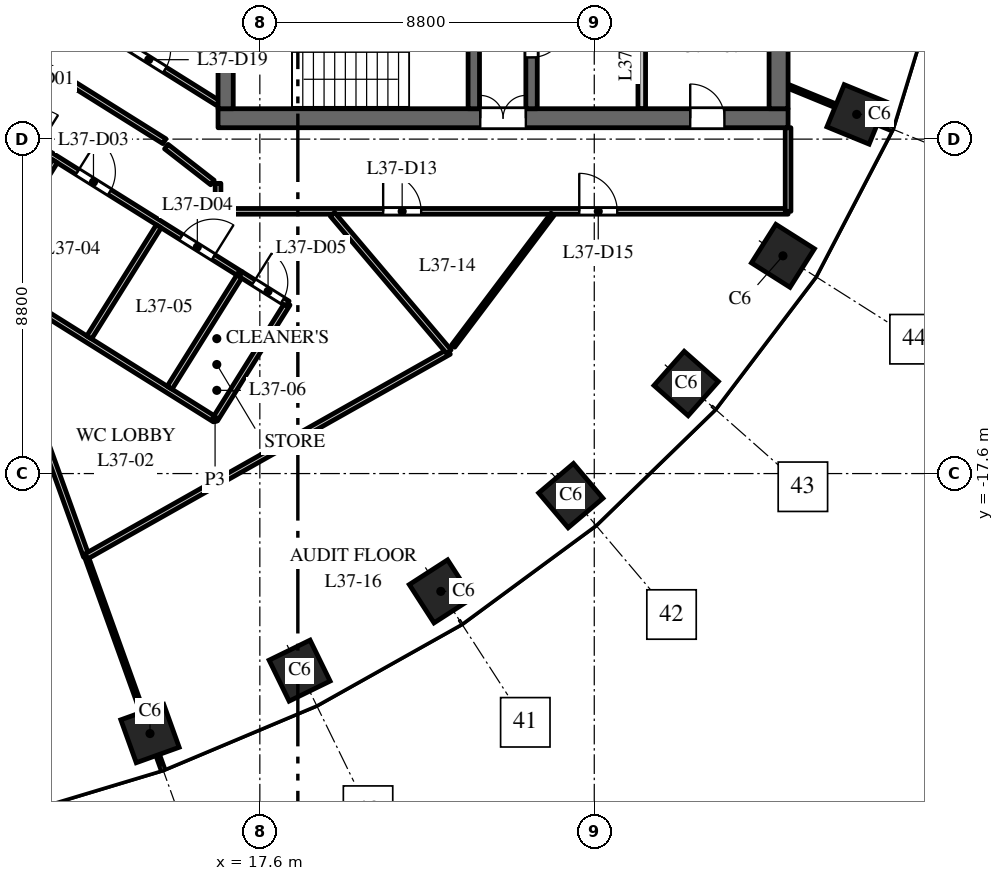
"""IFC4 building model, lengths in metres.
Left out: names, types, materials, properties, quantities, classifications, styles, units other than length and angle.
Written with IfcOpenShell. Run it as: python <this file> out.ifc"""

import sys

from ifc_helpers import new_model, si_unit, direction, frame, frame_2d, origin, origin_2d, place, context, subcontext, project, spatial, rectangle, extrude, element, fill, save


model = new_model("IFC4")
c1 = context("Model", 3, precision=1e-05, world=origin(), true_north=direction((0.0, 1.0)))
c2 = subcontext(c1, "Body", "Model", "MODEL_VIEW")
j1 = project(units=[si_unit("LENGTHUNIT", "METRE"), si_unit("PLANEANGLEUNIT", "RADIAN")], contexts=[c1])
p1 = place(None, origin())
s1 = spatial("IfcSite", under=j1, at=p1, CompositionType="ELEMENT")
p2 = place(p1, origin())
s2 = spatial("IfcBuilding", under=s1, at=p2, CompositionType="ELEMENT")
p3 = place(p2, frame((0.0, 0.0, 162.0)))
s3 = spatial("IfcBuildingStorey", under=s2, at=p3, CompositionType="ELEMENT", Elevation=162.0)
for number, where, z_axis, x_axis in (
    (1, (14.709, -24.441, 0.0), (0.0, 0.0, 1.0), (0.941, 0.338, 0.0)),
    (2, (18.646, -22.785, 0.0), (0.0, 0.0, 1.0), (0.898, 0.439, 0.0)),
    (3, (22.362, -20.7, 0.0), (0.0, 0.0, 1.0), (0.84, 0.542, 0.0)),
    (4, (25.783, -18.18, 0.0), (0.0, 0.0, 1.0), (0.763, 0.646, 0.0)),
    (5, (28.819, -15.23, 0.0), (0.0, 0.0, 1.0), (0.663, 0.749, 0.0)),
    (6, (31.365, -11.871, 0.0), (0.0, 0.0, 1.0), (0.535, 0.845, 0.0)),
    (7, (33.305, -8.149, 0.0), (0.0, 0.0, 1.0), (0.379, 0.925, 0.0)),
):
    element("IfcColumn", number, at=place(p3, frame(where, z_axis=z_axis, x_axis=x_axis)), inside=s3, PredefinedType="COLUMN", context=c2, shape_type="SweptSolid", body=[
        extrude(rectangle(XDim=1.2, YDim=1.2, at=origin_2d()), origin(), (0.0, 0.0, 1.0), 4.0),
    ])
p4 = place(p3, frame((16.5, -8.25, 0.0), z_axis=(0.0, 0.0, 1.0), x_axis=(1.0, 0.0, 0.0)))
e8 = element("IfcWall", 8, at=p4, inside=s3, PredefinedType="SHEAR", context=c2, shape_type="SweptSolid", body=[
    extrude(rectangle(XDim=15.0, YDim=0.5, at=frame_2d((7.5, 0.0))), origin(), (0.0, 0.0, 1.0), 3.7),
])
p5 = place(p4, frame((6.9, 0.0, 0.0)))
e9 = element("IfcOpeningElement", 9, at=p5, cuts=e8, PredefinedType="OPENING", context=c2, shape_type="SweptSolid", body=[
    extrude(rectangle(XDim=1.2, YDim=2.1, at=frame_2d((0.6, 1.05))), frame((0.0, 0.26, 0.0), z_axis=(0.0, -1.0, 0.0), x_axis=(1.0, 0.0, 0.0)), (0.0, 0.0, 1.0), 0.52),
])
p6 = place(p4, frame((12.425, 0.0, 0.0)))
e10 = element("IfcOpeningElement", 10, at=p6, cuts=e8, PredefinedType="OPENING", context=c2, shape_type="SweptSolid", body=[
    extrude(rectangle(XDim=0.9, YDim=2.1, at=frame_2d((0.45, 1.05))), frame((0.0, 0.26, 0.0), z_axis=(0.0, -1.0, 0.0), x_axis=(1.0, 0.0, 0.0)), (0.0, 0.0, 1.0), 0.52),
])
p7 = place(p3, frame((24.75, -8.0, 0.0), z_axis=(0.0, 0.0, 1.0), x_axis=(0.0, 1.0, 0.0)))
e11 = element("IfcWall", 11, at=p7, inside=s3, PredefinedType="SHEAR", context=c2, shape_type="SweptSolid", body=[
    extrude(rectangle(XDim=16.0, YDim=0.3, at=frame_2d((8.0, 0.0))), origin(), (0.0, 0.0, 1.0), 3.7),
])
p8 = place(p7, frame((4.425, 0.0, 0.0)))
e12 = element("IfcOpeningElement", 12, at=p8, cuts=e11, PredefinedType="OPENING", context=c2, shape_type="SweptSolid", body=[
    extrude(rectangle(XDim=1.1, YDim=2.1, at=frame_2d((0.55, 1.05))), frame((0.0, 0.16, 0.0), z_axis=(0.0, -1.0, 0.0), x_axis=(1.0, 0.0, 0.0)), (0.0, 0.0, 1.0), 0.32),
])
p9 = place(p7, frame((7.45, 0.0, 0.0)))
e13 = element("IfcOpeningElement", 13, at=p9, cuts=e11, PredefinedType="OPENING", context=c2, shape_type="SweptSolid", body=[
    extrude(rectangle(XDim=1.1, YDim=2.1, at=frame_2d((0.55, 1.05))), frame((0.0, 0.16, 0.0), z_axis=(0.0, -1.0, 0.0), x_axis=(1.0, 0.0, 0.0)), (0.0, 0.0, 1.0), 0.32),
])
p10 = place(p7, frame((10.475, 0.0, 0.0)))
e14 = element("IfcOpeningElement", 14, at=p10, cuts=e11, PredefinedType="OPENING", context=c2, shape_type="SweptSolid", body=[
    extrude(rectangle(XDim=1.1, YDim=2.1, at=frame_2d((0.55, 1.05))), frame((0.0, 0.16, 0.0), z_axis=(0.0, -1.0, 0.0), x_axis=(1.0, 0.0, 0.0)), (0.0, 0.0, 1.0), 0.32),
])
p11 = place(p7, frame((13.75, 0.0, 0.0)))
e15 = element("IfcOpeningElement", 15, at=p11, cuts=e11, PredefinedType="OPENING", context=c2, shape_type="SweptSolid", body=[
    extrude(rectangle(XDim=0.9, YDim=2.1, at=frame_2d((0.45, 1.05))), frame((0.0, 0.16, 0.0), z_axis=(0.0, -1.0, 0.0), x_axis=(1.0, 0.0, 0.0)), (0.0, 0.0, 1.0), 0.32),
])
p12 = place(p7, frame((1.35, 0.0, 0.0)))
e16 = element("IfcOpeningElement", 16, at=p12, cuts=e11, PredefinedType="OPENING", context=c2, shape_type="SweptSolid", body=[
    extrude(rectangle(XDim=0.9, YDim=2.1, at=frame_2d((0.45, 1.05))), frame((0.0, 0.16, 0.0), z_axis=(0.0, -1.0, 0.0), x_axis=(1.0, 0.0, 0.0)), (0.0, 0.0, 1.0), 0.32),
])
p13 = place(p3, frame((16.7, -8.0, 0.0), z_axis=(0.0, 0.0, 1.0), x_axis=(0.0, 1.0, 0.0)))
e17 = element("IfcWall", 17, at=p13, inside=s3, PredefinedType="SHEAR", context=c2, shape_type="SweptSolid", body=[
    extrude(rectangle(XDim=16.0, YDim=0.4, at=frame_2d((8.0, 0.0))), origin(), (0.0, 0.0, 1.0), 3.7),
])
p14 = place(p3, frame((31.25, -8.0, 0.0), z_axis=(0.0, 0.0, 1.0), x_axis=(0.0, 1.0, 0.0)))
e18 = element("IfcWall", 18, at=p14, inside=s3, PredefinedType="SHEAR", context=c2, shape_type="SweptSolid", body=[
    extrude(rectangle(XDim=16.0, YDim=0.5, at=frame_2d((8.0, 0.0))), origin(), (0.0, 0.0, 1.0), 3.7),
])
p15 = place(p3, frame((27.65, -8.0, 0.0), z_axis=(0.0, 0.0, 1.0), x_axis=(0.0, 1.0, 0.0)))
e19 = element("IfcWall", 19, at=p15, inside=s3, PredefinedType="PARTITIONING", context=c2, shape_type="SweptSolid", body=[
    extrude(rectangle(XDim=3.25, YDim=0.2, at=frame_2d((1.625, 0.0))), origin(), (0.0, 0.0, 1.0), 3.7),
])
p16 = place(p3, frame((23.23, -8.0, 0.0), z_axis=(0.0, 0.0, 1.0), x_axis=(0.0, 1.0, 0.0)))
e20 = element("IfcWall", 20, at=p16, inside=s3, PredefinedType="SHEAR", context=c2, shape_type="SweptSolid", body=[
    extrude(rectangle(XDim=7.875, YDim=0.3, at=frame_2d((3.938, 0.0))), origin(), (0.0, 0.0, 1.0), 3.7),
])
p17 = place(p16, frame((5.15, 0.0, 0.0)))
e21 = element("IfcOpeningElement", 21, at=p17, cuts=e20, PredefinedType="OPENING", context=c2, shape_type="SweptSolid", body=[
    extrude(rectangle(XDim=1.1, YDim=2.1, at=frame_2d((0.55, 1.05))), frame((0.0, 0.16, 0.0), z_axis=(0.0, -1.0, 0.0), x_axis=(1.0, 0.0, 0.0)), (0.0, 0.0, 1.0), 0.32),
])
p18 = place(p3, frame((7.608, -10.661, 0.0), z_axis=(0.0, 0.0, 1.0), x_axis=(0.847562482532, -0.530695617284, 0.0)))
e22 = element("IfcWall", 22, at=p18, inside=s3, PredefinedType="PARTITIONING", context=c2, shape_type="SweptSolid", body=[
    extrude(rectangle(XDim=10.392, YDim=0.15, at=frame_2d((5.196, 0.0))), origin(), (0.0, 0.0, 1.0), 3.7),
])
p19 = place(p3, frame((9.514, -7.61, 0.0), z_axis=(0.0, 0.0, 1.0), x_axis=(0.847740567707, -0.530411095155, 0.0)))
e23 = element("IfcWall", 23, at=p19, inside=s3, PredefinedType="PARTITIONING", context=c2, shape_type="SweptSolid", body=[
    extrude(rectangle(XDim=8.944, YDim=0.15, at=frame_2d((4.472, 0.0))), origin(), (0.0, 0.0, 1.0), 3.7),
])
p20 = place(p19, frame((1.65, 0.0, 0.0)))
e24 = element("IfcOpeningElement", 24, at=p20, cuts=e23, PredefinedType="OPENING", context=c2, shape_type="SweptSolid", body=[
    extrude(rectangle(XDim=1.0, YDim=2.1, at=frame_2d((0.5, 1.05))), frame((0.0, 0.085, 0.0), z_axis=(0.0, -1.0, 0.0), x_axis=(1.0, 0.0, 0.0)), (0.0, 0.0, 1.0), 0.17),
])
p21 = place(p19, frame((3.874, 0.0, 0.0)))
e25 = element("IfcOpeningElement", 25, at=p21, cuts=e23, PredefinedType="OPENING", context=c2, shape_type="SweptSolid", body=[
    extrude(rectangle(XDim=1.0, YDim=2.1, at=frame_2d((0.5, 1.05))), frame((0.0, 0.085, 0.0), z_axis=(0.0, -1.0, 0.0), x_axis=(1.0, 0.0, 0.0)), (0.0, 0.0, 1.0), 0.17),
])
p22 = place(p19, frame((7.098, 0.0, 0.0)))
e26 = element("IfcOpeningElement", 26, at=p22, cuts=e23, PredefinedType="OPENING", context=c2, shape_type="SweptSolid", body=[
    extrude(rectangle(XDim=1.0, YDim=2.1, at=frame_2d((0.5, 1.05))), frame((0.0, 0.085, 0.0), z_axis=(0.0, -1.0, 0.0), x_axis=(1.0, 0.0, 0.0)), (0.0, 0.0, 1.0), 0.17),
])
p23 = place(p3, frame((9.679, -5.469, 0.0), z_axis=(0.0, 0.0, 1.0), x_axis=(0.847602682855, -0.530631408811, 0.0)))
e27 = element("IfcWall", 27, at=p23, inside=s3, PredefinedType="PARTITIONING", context=c2, shape_type="SweptSolid", body=[
    extrude(rectangle(XDim=6.383, YDim=0.15, at=frame_2d((3.191, 0.0))), origin(), (0.0, 0.0, 1.0), 3.7),
])
p24 = place(p23, frame((0.65, 0.0, 0.0)))
e28 = element("IfcOpeningElement", 28, at=p24, cuts=e27, PredefinedType="OPENING", context=c2, shape_type="SweptSolid", body=[
    extrude(rectangle(XDim=1.0, YDim=2.1, at=frame_2d((0.5, 1.05))), frame((0.0, 0.085, 0.0), z_axis=(0.0, -1.0, 0.0), x_axis=(1.0, 0.0, 0.0)), (0.0, 0.0, 1.0), 0.17),
])
p25 = place(p3, frame((10.377, -12.306, 0.0), z_axis=(0.0, 0.0, 1.0), x_axis=(0.530889428354, 0.847441098167, 0.0)))
e29 = element("IfcWall", 29, at=p25, inside=s3, PredefinedType="PARTITIONING", context=c2, shape_type="SweptSolid", body=[
    extrude(rectangle(XDim=3.449, YDim=0.15, at=frame_2d((1.725, 0.0))), origin(), (0.0, 0.0, 1.0), 3.7),
])
p26 = place(p3, frame((10.752, -4.254, 0.0), z_axis=(0.0, 0.0, 1.0), x_axis=(0.847690706888, -0.530490777917, 0.0)))
e30 = element("IfcWall", 30, at=p26, inside=s3, PredefinedType="PARTITIONING", context=c2, shape_type="SweptSolid", body=[
    extrude(rectangle(XDim=6.781, YDim=0.15, at=frame_2d((3.39, 0.0))), origin(), (0.0, 0.0, 1.0), 3.7),
])
p27 = place(p26, frame((4.129, 0.0, 0.0)))
e31 = element("IfcOpeningElement", 31, at=p27, cuts=e30, PredefinedType="OPENING", context=c2, shape_type="SweptSolid", body=[
    extrude(rectangle(XDim=1.0, YDim=2.1, at=frame_2d((0.5, 1.05))), frame((0.0, 0.085, 0.0), z_axis=(0.0, -1.0, 0.0), x_axis=(1.0, 0.0, 0.0)), (0.0, 0.0, 1.0), 0.17),
])
p28 = place(p3, frame((11.429, -15.32, 0.0), z_axis=(0.0, 0.0, 1.0), x_axis=(0.338520464006, -0.940959029634, 0.0)))
e32 = element("IfcWall", 32, at=p28, inside=s3, PredefinedType="PARTITIONING", context=c2, shape_type="SweptSolid", body=[
    extrude(rectangle(XDim=4.735, YDim=0.15, at=frame_2d((2.368, 0.0))), origin(), (0.0, 0.0, 1.0), 3.7),
])
p29 = place(p3, frame((13.032, -19.776, 0.0), z_axis=(0.0, 0.0, 1.0), x_axis=(0.338352371411, -0.941019485856, 0.0)))
e33 = element("IfcWall", 33, at=p29, inside=s3, PredefinedType="PARTITIONING", context=c2, shape_type="SweptSolid", body=[
    extrude(rectangle(XDim=5.959, YDim=0.1, at=frame_2d((2.979, 0.0))), origin(), (0.0, 0.0, 1.0), 2.85),
])
p30 = place(p3, frame((13.034, -19.779, 0.0), z_axis=(0.0, 0.0, 1.0), x_axis=(0.870903388322, 0.491454258512, 0.0)))
e34 = element("IfcWall", 34, at=p30, inside=s3, PredefinedType="PARTITIONING", context=c2, shape_type="SweptSolid", body=[
    extrude(rectangle(XDim=10.955, YDim=0.15, at=frame_2d((5.478, 0.0))), origin(), (0.0, 0.0, 1.0), 3.7),
])
p31 = place(p3, frame((13.11, -14.017, 0.0), z_axis=(0.0, 0.0, 1.0), x_axis=(0.530603340991, 0.847620253727, 0.0)))
e35 = element("IfcWall", 35, at=p31, inside=s3, PredefinedType="PARTITIONING", context=c2, shape_type="SweptSolid", body=[
    extrude(rectangle(XDim=3.448, YDim=0.15, at=frame_2d((1.724, 0.0))), origin(), (0.0, 0.0, 1.0), 3.7),
])
p32 = place(p3, frame((15.226, -15.341, 0.0), z_axis=(0.0, 0.0, 1.0), x_axis=(0.530602850446, 0.847620560805, 0.0)))
e36 = element("IfcWall", 36, at=p32, inside=s3, PredefinedType="PARTITIONING", context=c2, shape_type="SweptSolid", body=[
    extrude(rectangle(XDim=3.524, YDim=0.15, at=frame_2d((1.762, 0.0))), origin(), (0.0, 0.0, 1.0), 3.7),
])
p33 = place(p3, frame((16.422, -16.175, 0.0), z_axis=(0.0, 0.0, 1.0), x_axis=(0.530578570881, 0.84763575911, 0.0)))
e37 = element("IfcWall", 37, at=p33, inside=s3, PredefinedType="PARTITIONING", context=c2, shape_type="SweptSolid", body=[
    extrude(rectangle(XDim=3.596, YDim=0.15, at=frame_2d((1.798, 0.0))), origin(), (0.0, 0.0, 1.0), 3.7),
])
p34 = place(p3, frame((16.5, -10.7, 0.0), z_axis=(0.0, 0.0, 1.0), x_axis=(0.0, 1.0, 0.0)))
e38 = element("IfcWall", 38, at=p34, inside=s3, PredefinedType="PARTITIONING", context=c2, shape_type="SweptSolid", body=[
    extrude(rectangle(XDim=0.736, YDim=0.15, at=frame_2d((0.368, 0.0))), origin(), (0.0, 0.0, 1.0), 3.7),
])
p35 = place(p3, frame((16.5, -10.7, 0.0), z_axis=(0.0, 0.0, 1.0), x_axis=(1.0, 0.0, 0.0)))
e39 = element("IfcWall", 39, at=p35, inside=s3, PredefinedType="PARTITIONING", context=c2, shape_type="SweptSolid", body=[
    extrude(rectangle(XDim=15.0, YDim=0.15, at=frame_2d((7.5, 0.0))), origin(), (0.0, 0.0, 1.0), 2.75),
])
p36 = place(p35, frame((4.345, 0.0, 0.0)))
e40 = element("IfcOpeningElement", 40, at=p36, cuts=e39, PredefinedType="OPENING", context=c2, shape_type="SweptSolid", body=[
    extrude(rectangle(XDim=1.0, YDim=2.1, at=frame_2d((0.5, 1.05))), frame((0.0, 0.085, 0.0), z_axis=(0.0, -1.0, 0.0), x_axis=(1.0, 0.0, 0.0)), (0.0, 0.0, 1.0), 0.17),
])
p37 = place(p35, frame((9.505, 0.0, 0.0)))
e41 = element("IfcOpeningElement", 41, at=p37, cuts=e39, PredefinedType="OPENING", context=c2, shape_type="SweptSolid", body=[
    extrude(rectangle(XDim=1.0, YDim=2.1, at=frame_2d((0.5, 1.05))), frame((0.0, 0.085, 0.0), z_axis=(0.0, -1.0, 0.0), x_axis=(1.0, 0.0, 0.0)), (0.0, 0.0, 1.0), 0.17),
])
p38 = place(p3, frame((17.096, -12.354, 0.0), z_axis=(0.0, 0.0, 1.0), x_axis=(0.847498728789, -0.530797423412, 0.0)))
e42 = element("IfcWall", 42, at=p38, inside=s3, PredefinedType="PARTITIONING", context=c2, shape_type="SweptSolid", body=[
    extrude(rectangle(XDim=1.456, YDim=0.15, at=frame_2d((0.728, 0.0))), origin(), (0.0, 0.0, 1.0), 3.7),
])
p39 = place(p38, frame((0.4, 0.0, 0.0)))
e43 = element("IfcOpeningElement", 43, at=p39, cuts=e42, PredefinedType="OPENING", context=c2, shape_type="SweptSolid", body=[
    extrude(rectangle(XDim=0.9, YDim=2.1, at=frame_2d((0.45, 1.05))), frame((0.0, 0.085, 0.0), z_axis=(0.0, -1.0, 0.0), x_axis=(1.0, 0.0, 0.0)), (0.0, 0.0, 1.0), 0.17),
])
p40 = place(p3, frame((19.511, -10.778, 0.0), z_axis=(0.0, 0.0, 1.0), x_axis=(0.646369264436, -0.763024753197, 0.0)))
e44 = element("IfcWall", 44, at=p40, inside=s3, PredefinedType="PARTITIONING", context=c2, shape_type="SweptSolid", body=[
    extrude(rectangle(XDim=4.74, YDim=0.15, at=frame_2d((2.37, 0.0))), origin(), (0.0, 0.0, 1.0), 3.7),
])
p41 = place(p3, frame((22.688, -14.245, 0.0), z_axis=(0.0, 0.0, 1.0), x_axis=(0.6020222506, 0.798479310804, 0.0)))
e45 = element("IfcWall", 45, at=p41, inside=s3, PredefinedType="PARTITIONING", context=c2, shape_type="SweptSolid", body=[
    extrude(rectangle(XDim=4.342, YDim=0.1, at=frame_2d((2.171, 0.0))), origin(), (0.0, 0.0, 1.0), 2.75),
])
p42 = place(p3, frame((31.5, -10.7, 0.0), z_axis=(0.0, 0.0, 1.0), x_axis=(0.0, 1.0, 0.0)))
e46 = element("IfcWall", 46, at=p42, inside=s3, PredefinedType="PARTITIONING", context=c2, shape_type="SweptSolid", body=[
    extrude(rectangle(XDim=2.2, YDim=0.15, at=frame_2d((1.1, 0.0))), origin(), (0.0, 0.0, 1.0), 2.9),
])
p43 = place(p3, frame((31.5, -7.41, 0.0), z_axis=(0.0, 0.0, 1.0), x_axis=(0.925344112436, -0.379128307542, 0.0)))
e47 = element("IfcWall", 47, at=p43, inside=s3, PredefinedType="PARTITIONING", context=c2, shape_type="SweptSolid", body=[
    extrude(rectangle(XDim=2.954, YDim=0.1, at=frame_2d((1.477, 0.0))), origin(), (0.0, 0.0, 1.0), 3.7),
])
p44 = place(p3, frame((16.352, -9.942, 0.0), z_axis=(0.0, 0.0, 1.0), x_axis=(-0.788950226826, 0.614457109643, 0.0)))
e48 = element("IfcWall", 48, at=p44, inside=s3, PredefinedType="PARTITIONING", context=c2, shape_type="SweptSolid", body=[
    extrude(rectangle(XDim=1.538, YDim=0.15, at=frame_2d((0.769, 0.0))), origin(), (0.0, 0.0, 1.0), 3.7),
])
p45 = place(p5, origin())
e49 = element("IfcDoor", 49, at=p45, inside=s3, OperationType="DOUBLE_DOOR_DOUBLE_SWING", PredefinedType="DOOR", context=c2, shape_type="SweptSolid", body=[
    extrude(rectangle(XDim=1.2, YDim=2.1, at=frame_2d((0.6, 1.05))), frame((0.0, 0.025, 0.0), z_axis=(0.0, -1.0, 0.0), x_axis=(1.0, 0.0, 0.0)), (0.0, 0.0, 1.0), 0.05),
])
fill(e9, e49)
p46 = place(p12, origin())
e50 = element("IfcDoor", 50, at=p46, inside=s3, OperationType="SINGLE_SWING_RIGHT", PredefinedType="DOOR", context=c2, shape_type="SweptSolid", body=[
    extrude(rectangle(XDim=0.9, YDim=2.1, at=frame_2d((0.45, 1.05))), frame((0.0, 0.025, 0.0), z_axis=(0.0, -1.0, 0.0), x_axis=(1.0, 0.0, 0.0)), (0.0, 0.0, 1.0), 0.05),
])
fill(e16, e50)
p47 = place(p6, origin())
e51 = element("IfcDoor", 51, at=p47, inside=s3, OperationType="SINGLE_SWING_RIGHT", PredefinedType="DOOR", context=c2, shape_type="SweptSolid", body=[
    extrude(rectangle(XDim=0.9, YDim=2.1, at=frame_2d((0.45, 1.05))), frame((0.0, 0.025, 0.0), z_axis=(0.0, -1.0, 0.0), x_axis=(1.0, 0.0, 0.0)), (0.0, 0.0, 1.0), 0.05),
])
fill(e10, e51)
p48 = place(p21, origin())
e52 = element("IfcDoor", 52, at=p48, inside=s3, OperationType="SINGLE_SWING_LEFT", PredefinedType="DOOR", context=c2, shape_type="SweptSolid", body=[
    extrude(rectangle(XDim=1.0, YDim=2.1, at=frame_2d((0.5, 1.05))), frame((0.0, 0.025, 0.0), z_axis=(0.0, -1.0, 0.0), x_axis=(1.0, 0.0, 0.0)), (0.0, 0.0, 1.0), 0.05),
])
fill(e25, e52)
p49 = place(p22, origin())
e53 = element("IfcDoor", 53, at=p49, inside=s3, OperationType="SINGLE_SWING_RIGHT", PredefinedType="DOOR", context=c2, shape_type="SweptSolid", body=[
    extrude(rectangle(XDim=1.0, YDim=2.1, at=frame_2d((0.5, 1.05))), frame((0.0, 0.025, 0.0), z_axis=(0.0, -1.0, 0.0), x_axis=(1.0, 0.0, 0.0)), (0.0, 0.0, 1.0), 0.05),
])
fill(e26, e53)
p50 = place(p39, origin())
e54 = element("IfcDoor", 54, at=p50, inside=s3, OperationType="SINGLE_SWING_LEFT", PredefinedType="DOOR", context=c2, shape_type="SweptSolid", body=[
    extrude(rectangle(XDim=0.9, YDim=2.1, at=frame_2d((0.45, 1.05))), frame((0.0, 0.025, 0.0), z_axis=(0.0, -1.0, 0.0), x_axis=(1.0, 0.0, 0.0)), (0.0, 0.0, 1.0), 0.05),
])
fill(e43, e54)
p51 = place(p36, origin())
e55 = element("IfcDoor", 55, at=p51, inside=s3, OperationType="SINGLE_SWING_LEFT", PredefinedType="DOOR", context=c2, shape_type="SweptSolid", body=[
    extrude(rectangle(XDim=1.0, YDim=2.1, at=frame_2d((0.5, 1.05))), frame((0.0, 0.025, 0.0), z_axis=(0.0, -1.0, 0.0), x_axis=(1.0, 0.0, 0.0)), (0.0, 0.0, 1.0), 0.05),
])
fill(e40, e55)
p52 = place(p37, origin())
e56 = element("IfcDoor", 56, at=p52, inside=s3, OperationType="SINGLE_SWING_LEFT", PredefinedType="DOOR", context=c2, shape_type="SweptSolid", body=[
    extrude(rectangle(XDim=1.0, YDim=2.1, at=frame_2d((0.5, 1.05))), frame((0.0, 0.025, 0.0), z_axis=(0.0, -1.0, 0.0), x_axis=(1.0, 0.0, 0.0)), (0.0, 0.0, 1.0), 0.05),
])
fill(e41, e56)
p53 = place(p27, origin())
e57 = element("IfcDoor", 57, at=p53, inside=s3, OperationType="SINGLE_SWING_LEFT", PredefinedType="DOOR", context=c2, shape_type="SweptSolid", body=[
    extrude(rectangle(XDim=1.0, YDim=2.1, at=frame_2d((0.5, 1.05))), frame((0.0, 0.025, 0.0), z_axis=(0.0, -1.0, 0.0), x_axis=(1.0, 0.0, 0.0)), (0.0, 0.0, 1.0), 0.05),
])
fill(e31, e57)
save(model, sys.argv[1])
